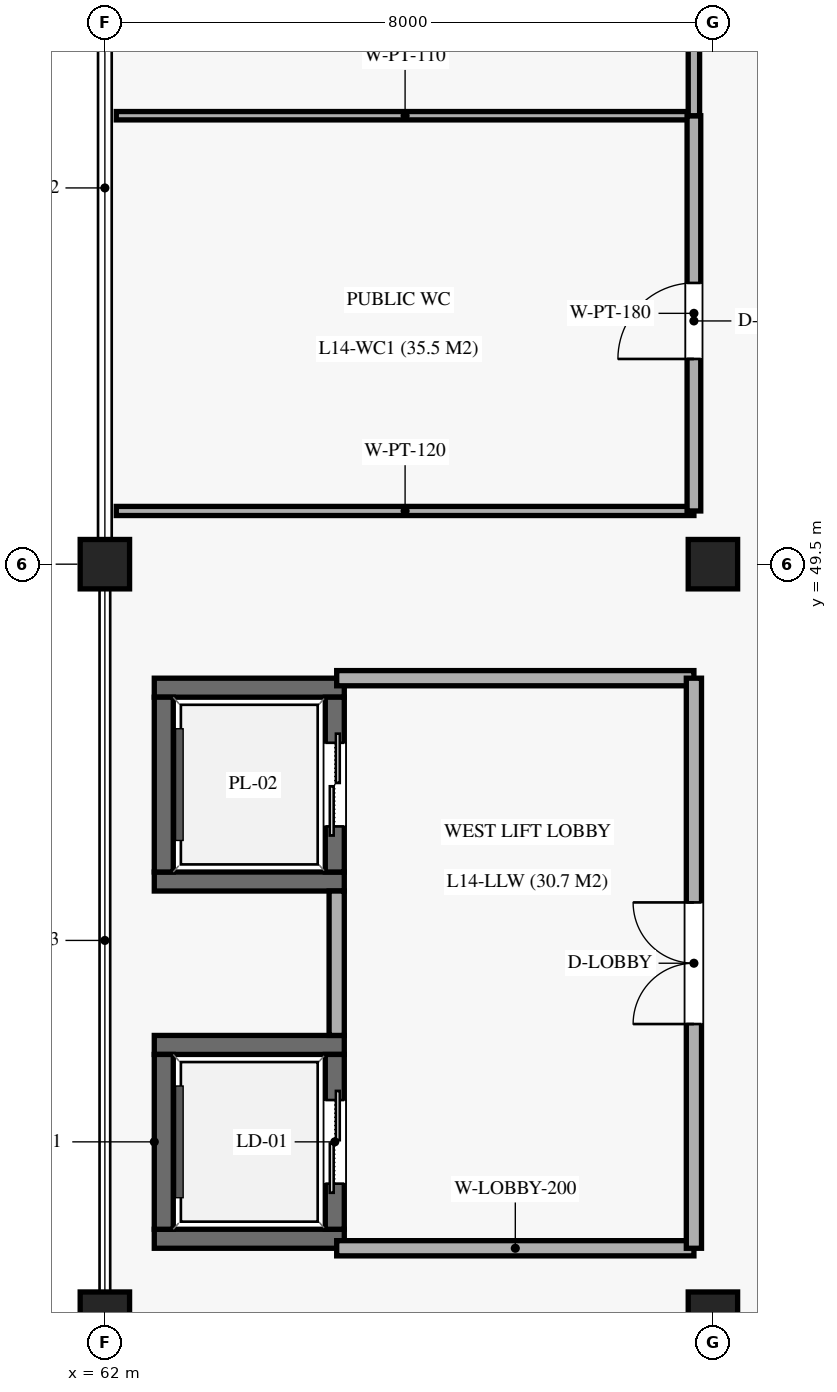
"""IFC4 building model, lengths in metres.
Left out: names, types, materials, properties, quantities, classifications, styles, units other than length and angle.
Written with IfcOpenShell. Run it as: python <this file> out.ifc"""

import sys

from ifc_helpers import new_model, si_unit, direction, frame, frame_2d, origin, origin_2d, place, context, subcontext, project, spatial, rectangle, extrude, element, fill, save


model = new_model("IFC4")
c1 = context("Model", 3, precision=1e-05, world=origin(), true_north=direction((0.0, 1.0)))
c2 = subcontext(c1, "Body", "Model", "MODEL_VIEW")
j1 = project(units=[si_unit("LENGTHUNIT", "METRE"), si_unit("PLANEANGLEUNIT", "RADIAN")], contexts=[c1])
p1 = place(None, origin())
s1 = spatial("IfcSite", under=j1, at=p1, CompositionType="ELEMENT")
p2 = place(p1, origin())
s2 = spatial("IfcBuilding", under=s1, at=p2, CompositionType="ELEMENT")
p3 = place(p2, frame((0.0, 0.0, 70.38)))
s3 = spatial("IfcBuildingStorey", under=s2, at=p3, CompositionType="ELEMENT", Elevation=70.38)
for number, where, z_axis, x_axis in (
    (1, (62.0, 39.6, 0.0), (0.0, 0.0, 1.0), (1.0, 0.0, 0.0)),
    (2, (62.0, 49.5, 0.0), (0.0, 0.0, 1.0), (1.0, 0.0, 0.0)),
    (3, (70.0, 39.6, 0.0), (0.0, 0.0, 1.0), (1.0, 0.0, 0.0)),
    (4, (70.0, 49.5, 0.0), (0.0, 0.0, 1.0), (1.0, 0.0, 0.0)),
):
    element("IfcColumn", number, at=place(p3, frame(where, z_axis=z_axis, x_axis=x_axis)), inside=s3, PredefinedType="COLUMN", context=c2, shape_type="SweptSolid", body=[
        extrude(rectangle(XDim=0.65, YDim=0.65, at=origin_2d()), origin(), (0.0, 0.0, 1.0), 4.08),
    ])
for number, where, z_axis, x_axis in (
    (5, (62.65, 40.625, 0.0), (0.0, 0.0, 1.0), (1.0, 0.0, 0.0)),
    (6, (62.65, 43.175, 0.0), (0.0, 0.0, 1.0), (1.0, 0.0, 0.0)),
):
    element("IfcWall", number, at=place(p3, frame(where, z_axis=z_axis, x_axis=x_axis)), inside=s3, PredefinedType="SOLIDWALL", context=c2, shape_type="SweptSolid", body=[
        extrude(rectangle(XDim=2.5, YDim=0.25, at=frame_2d((1.25, 0.0))), origin(), (0.0, 0.0, 1.0), 3.81),
    ])
p4 = place(p3, frame((62.775, 40.75, 0.0), z_axis=(0.0, 0.0, 1.0), x_axis=(0.0, 1.0, 0.0)))
e7 = element("IfcWall", 7, at=p4, inside=s3, PredefinedType="SOLIDWALL", context=c2, shape_type="SweptSolid", body=[
    extrude(rectangle(XDim=2.3, YDim=0.25, at=frame_2d((1.15, 0.0))), origin(), (0.0, 0.0, 1.0), 3.81),
])
p5 = place(p3, frame((65.025, 40.75, 0.0), z_axis=(0.0, 0.0, 1.0), x_axis=(0.0, 1.0, 0.0)))
e8 = element("IfcWall", 8, at=p5, inside=s3, PredefinedType="SOLIDWALL", context=c2, shape_type="SweptSolid", body=[
    extrude(rectangle(XDim=2.3, YDim=0.25, at=frame_2d((1.15, 0.0))), origin(), (0.0, 0.0, 1.0), 3.81),
])
p6 = place(p5, frame((0.6, 0.0, 0.0)))
e9 = element("IfcOpeningElement", 9, at=p6, cuts=e8, PredefinedType="OPENING", context=c2, shape_type="SweptSolid", body=[
    extrude(rectangle(XDim=1.1, YDim=2.2, at=frame_2d((0.55, 1.1))), frame((0.0, 0.135, 0.0), z_axis=(0.0, -1.0, 0.0), x_axis=(1.0, 0.0, 0.0)), (0.0, 0.0, 1.0), 0.27),
])
for number, where, z_axis, x_axis in (
    (10, (62.65, 45.325, 0.0), (0.0, 0.0, 1.0), (1.0, 0.0, 0.0)),
    (11, (62.65, 47.875, 0.0), (0.0, 0.0, 1.0), (1.0, 0.0, 0.0)),
):
    element("IfcWall", number, at=place(p3, frame(where, z_axis=z_axis, x_axis=x_axis)), inside=s3, PredefinedType="SOLIDWALL", context=c2, shape_type="SweptSolid", body=[
        extrude(rectangle(XDim=2.5, YDim=0.25, at=frame_2d((1.25, 0.0))), origin(), (0.0, 0.0, 1.0), 3.81),
    ])
p7 = place(p3, frame((62.775, 45.45, 0.0), z_axis=(0.0, 0.0, 1.0), x_axis=(0.0, 1.0, 0.0)))
e12 = element("IfcWall", 12, at=p7, inside=s3, PredefinedType="SOLIDWALL", context=c2, shape_type="SweptSolid", body=[
    extrude(rectangle(XDim=2.3, YDim=0.25, at=frame_2d((1.15, 0.0))), origin(), (0.0, 0.0, 1.0), 3.81),
])
p8 = place(p3, frame((65.025, 45.45, 0.0), z_axis=(0.0, 0.0, 1.0), x_axis=(0.0, 1.0, 0.0)))
e13 = element("IfcWall", 13, at=p8, inside=s3, PredefinedType="SOLIDWALL", context=c2, shape_type="SweptSolid", body=[
    extrude(rectangle(XDim=2.3, YDim=0.25, at=frame_2d((1.15, 0.0))), origin(), (0.0, 0.0, 1.0), 3.81),
])
p9 = place(p8, frame((0.6, 0.0, 0.0)))
e14 = element("IfcOpeningElement", 14, at=p9, cuts=e13, PredefinedType="OPENING", context=c2, shape_type="SweptSolid", body=[
    extrude(rectangle(XDim=1.1, YDim=2.2, at=frame_2d((0.55, 1.1))), frame((0.0, 0.135, 0.0), z_axis=(0.0, -1.0, 0.0), x_axis=(1.0, 0.0, 0.0)), (0.0, 0.0, 1.0), 0.27),
])
for number, where, z_axis, x_axis in (
    (15, (65.05, 40.5, 0.0), (0.0, 0.0, 1.0), (1.0, 0.0, 0.0)),
    (16, (65.05, 48.0, 0.0), (0.0, 0.0, 1.0), (1.0, 0.0, 0.0)),
):
    element("IfcWall", number, at=place(p3, frame(where, z_axis=z_axis, x_axis=x_axis)), inside=s3, PredefinedType="SOLIDWALL", context=c2, shape_type="SweptSolid", body=[
        extrude(rectangle(XDim=4.7, YDim=0.2, at=frame_2d((2.35, 0.0))), origin(), (0.0, 0.0, 1.0), 2.95),
    ])
p10 = place(p3, frame((65.05, 43.3, 0.0), z_axis=(0.0, 0.0, 1.0), x_axis=(0.0, 1.0, 0.0)))
e17 = element("IfcWall", 17, at=p10, inside=s3, PredefinedType="SOLIDWALL", context=c2, shape_type="SweptSolid", body=[
    extrude(rectangle(XDim=1.9, YDim=0.2, at=frame_2d((0.95, 0.0))), origin(), (0.0, 0.0, 1.0), 2.95),
])
p11 = place(p3, frame((69.75, 40.5, 0.0), z_axis=(0.0, 0.0, 1.0), x_axis=(0.0, 1.0, 0.0)))
e18 = element("IfcWall", 18, at=p11, inside=s3, PredefinedType="SOLIDWALL", context=c2, shape_type="SweptSolid", body=[
    extrude(rectangle(XDim=7.5, YDim=0.2, at=frame_2d((3.75, 0.0))), origin(), (0.0, 0.0, 1.0), 2.95),
])
p12 = place(p11, frame((2.95, 0.0, 0.0)))
e19 = element("IfcOpeningElement", 19, at=p12, cuts=e18, PredefinedType="OPENING", context=c2, shape_type="SweptSolid", body=[
    extrude(rectangle(XDim=1.6, YDim=2.2, at=frame_2d((0.8, 1.1))), frame((0.0, 0.11, 0.0), z_axis=(0.0, -1.0, 0.0), x_axis=(1.0, 0.0, 0.0)), (0.0, 0.0, 1.0), 0.22),
])
p13 = place(p3, frame((62.15, 50.2, 0.0), z_axis=(0.0, 0.0, 1.0), x_axis=(1.0, 0.0, 0.0)))
e20 = element("IfcWall", 20, at=p13, inside=s3, PredefinedType="PARTITIONING", context=c2, shape_type="SweptSolid", body=[
    extrude(rectangle(XDim=7.6, YDim=0.12, at=frame_2d((3.8, 0.0))), origin(), (0.0, 0.0, 1.0), 2.95),
])
p14 = place(p3, frame((62.15, 55.4, 0.0), z_axis=(0.0, 0.0, 1.0), x_axis=(1.0, 0.0, 0.0)))
e21 = element("IfcWall", 21, at=p14, inside=s3, PredefinedType="PARTITIONING", context=c2, shape_type="SweptSolid", body=[
    extrude(rectangle(XDim=7.6, YDim=0.11, at=frame_2d((3.8, 0.0))), origin(), (0.0, 0.0, 1.0), 2.95),
])
p15 = place(p3, frame((69.75, 50.2, 0.0), z_axis=(0.0, 0.0, 1.0), x_axis=(0.0, 1.0, 0.0)))
e22 = element("IfcWall", 22, at=p15, inside=s3, PredefinedType="PARTITIONING", context=c2, shape_type="SweptSolid", body=[
    extrude(rectangle(XDim=5.2, YDim=0.18, at=frame_2d((2.6, 0.0))), origin(), (0.0, 0.0, 1.0), 2.95),
])
p16 = place(p15, frame((2.0, 0.0, 0.0)))
e23 = element("IfcOpeningElement", 23, at=p16, cuts=e22, PredefinedType="OPENING", context=c2, shape_type="SweptSolid", body=[
    extrude(rectangle(XDim=1.0, YDim=2.1, at=frame_2d((0.5, 1.05))), frame((0.0, 0.1, 0.0), z_axis=(0.0, -1.0, 0.0), x_axis=(1.0, 0.0, 0.0)), (0.0, 0.0, 1.0), 0.2),
])
p17 = place(p3, frame((69.75, 55.4, 0.0), z_axis=(0.0, 0.0, 1.0), x_axis=(0.0, 1.0, 0.0)))
e24 = element("IfcWall", 24, at=p17, inside=s3, PredefinedType="PARTITIONING", context=c2, shape_type="SweptSolid", body=[
    extrude(rectangle(XDim=3.5, YDim=0.15, at=frame_2d((1.75, 0.0))), origin(), (0.0, 0.0, 1.0), 2.95),
])
p18 = place(p17, frame((1.15, 0.0, 0.0)))
e25 = element("IfcOpeningElement", 25, at=p18, cuts=e24, PredefinedType="OPENING", context=c2, shape_type="SweptSolid", body=[
    extrude(rectangle(XDim=1.05, YDim=2.15, at=frame_2d((0.525, 1.075))), frame((0.0, 0.085, 0.0), z_axis=(0.0, -1.0, 0.0), x_axis=(1.0, 0.0, 0.0)), (0.0, 0.0, 1.0), 0.17),
])
p19 = place(p6, origin())
e26 = element("IfcDoor", 26, at=p19, inside=s3, OperationType="DOUBLE_DOOR_SLIDING", PredefinedType="DOOR", context=c2, shape_type="SweptSolid", body=[
    extrude(rectangle(XDim=1.1, YDim=2.2, at=frame_2d((0.55, 1.1))), frame((0.0, 0.025, 0.0), z_axis=(0.0, -1.0, 0.0), x_axis=(1.0, 0.0, 0.0)), (0.0, 0.0, 1.0), 0.05),
])
fill(e9, e26)
p20 = place(p9, origin())
e27 = element("IfcDoor", 27, at=p20, inside=s3, OperationType="DOUBLE_DOOR_SLIDING", PredefinedType="DOOR", context=c2, shape_type="SweptSolid", body=[
    extrude(rectangle(XDim=1.1, YDim=2.2, at=frame_2d((0.55, 1.1))), frame((0.0, 0.025, 0.0), z_axis=(0.0, -1.0, 0.0), x_axis=(1.0, 0.0, 0.0)), (0.0, 0.0, 1.0), 0.05),
])
fill(e14, e27)
p21 = place(p12, origin())
e28 = element("IfcDoor", 28, at=p21, inside=s3, OperationType="DOUBLE_DOOR_SINGLE_SWING", PredefinedType="DOOR", context=c2, shape_type="SweptSolid", body=[
    extrude(rectangle(XDim=1.6, YDim=2.2, at=frame_2d((0.8, 1.1))), frame((0.0, 0.025, 0.0), z_axis=(0.0, -1.0, 0.0), x_axis=(1.0, 0.0, 0.0)), (0.0, 0.0, 1.0), 0.05),
])
fill(e19, e28)
p22 = place(p16, origin())
e29 = element("IfcDoor", 29, at=p22, inside=s3, OperationType="SINGLE_SWING_LEFT", PredefinedType="DOOR", context=c2, shape_type="SweptSolid", body=[
    extrude(rectangle(XDim=1.0, YDim=2.1, at=frame_2d((0.5, 1.05))), frame((0.0, 0.025, 0.0), z_axis=(0.0, -1.0, 0.0), x_axis=(1.0, 0.0, 0.0)), (0.0, 0.0, 1.0), 0.05),
])
fill(e23, e29)
save(model, sys.argv[1])
